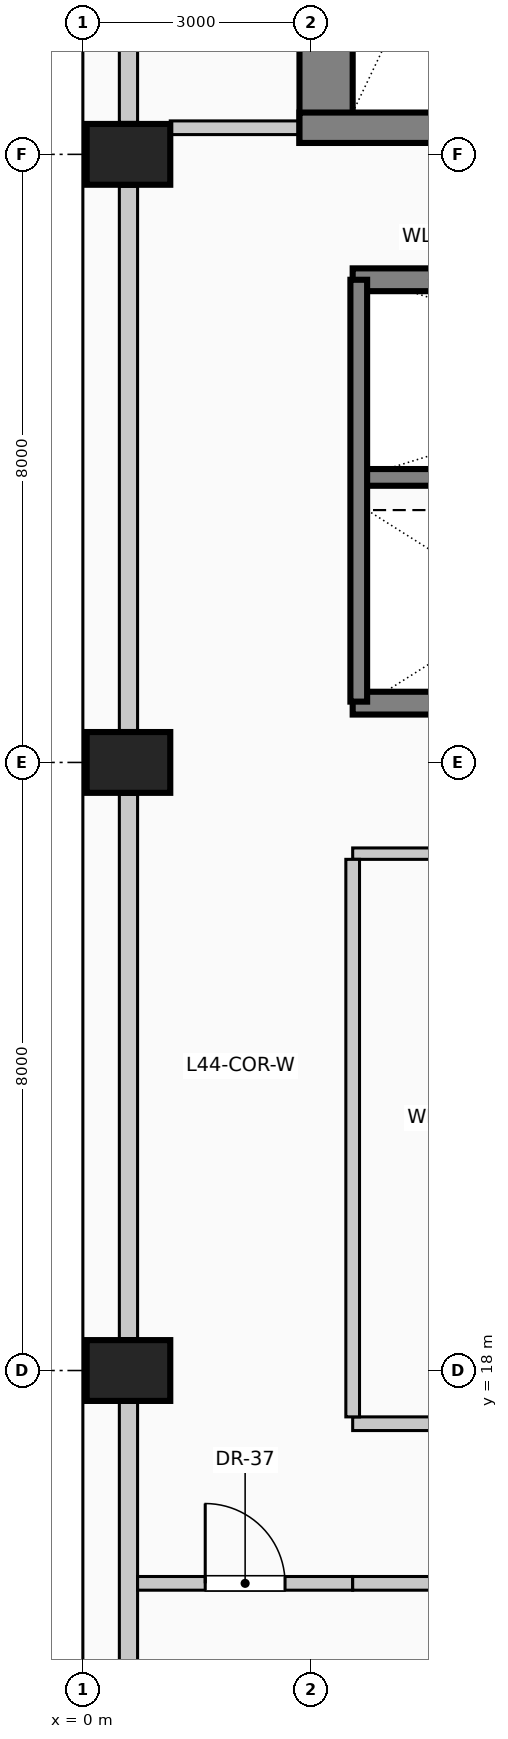
"""IFC4 building model, lengths in metres.
Left out: names, types, materials, properties, quantities, classifications, styles, units other than length and angle.
Written with IfcOpenShell. Run it as: python <this file> out.ifc"""

import sys

from ifc_helpers import new_model, si_unit, direction, frame, frame_2d, origin, origin_2d, place, context, subcontext, project, spatial, rectangle, extrude, element, fill, save


model = new_model("IFC4")
c1 = context("Model", 3, precision=1e-05, world=origin(), true_north=direction((0.0, 1.0)))
c2 = subcontext(c1, "Body", "Model", "MODEL_VIEW")
j1 = project(units=[si_unit("LENGTHUNIT", "METRE"), si_unit("PLANEANGLEUNIT", "RADIAN")], contexts=[c1])
p1 = place(None, origin())
s1 = spatial("IfcSite", under=j1, at=p1, CompositionType="ELEMENT")
p2 = place(p1, origin())
s2 = spatial("IfcBuilding", under=s1, at=p2, CompositionType="ELEMENT")
p3 = place(p2, frame((0.0, 0.0, 182.6)))
s3 = spatial("IfcBuildingStorey", under=s2, at=p3, CompositionType="ELEMENT", Elevation=182.6)
p4 = place(p3, frame((3.2, 34.15, 0.0), z_axis=(0.0, 0.0, 1.0), x_axis=(0.0, 1.0, 0.0)))
e1 = element("IfcWall", 1, at=p4, inside=s3, PredefinedType="SHEAR", context=c2, shape_type="SweptSolid", body=[
    extrude(rectangle(XDim=8.98, YDim=0.7, at=frame_2d((4.49, 0.0))), origin(), (0.0, 0.0, 1.0), 4.0),
])
p5 = place(p3, frame((2.85, 34.35, 0.0), z_axis=(0.0, 0.0, 1.0), x_axis=(1.0, 0.0, 0.0)))
e2 = element("IfcWall", 2, at=p5, inside=s3, PredefinedType="SHEAR", context=c2, shape_type="SweptSolid", body=[
    extrude(rectangle(XDim=4.86, YDim=0.4, at=frame_2d((2.43, 0.0))), origin(), (0.0, 0.0, 1.0), 4.0),
])
p6 = place(p5, frame((2.4, 0.0, 0.0)))
e3 = element("IfcOpeningElement", 3, at=p6, cuts=e2, PredefinedType="OPENING", context=c2, shape_type="SweptSolid", body=[
    extrude(rectangle(XDim=1.15, YDim=2.2, at=frame_2d((0.575, 1.1))), frame((0.0, 0.21, 0.0), z_axis=(0.0, -1.0, 0.0), x_axis=(1.0, 0.0, 0.0)), (0.0, 0.0, 1.0), 0.42),
])
for number, where, z_axis, x_axis in (
    (4, (0.6, 18.0, 0.0), (0.0, 0.0, 1.0), (0.0, 1.0, 0.0)),
    (5, (0.6, 26.0, 0.0), (0.0, 0.0, 1.0), (0.0, 1.0, 0.0)),
    (6, (0.6, 34.0, 0.0), (0.0, 0.0, 1.0), (0.0, 1.0, 0.0)),
):
    element("IfcColumn", number, at=place(p3, frame(where, z_axis=z_axis, x_axis=x_axis)), inside=s3, PredefinedType="COLUMN", context=c2, shape_type="SweptSolid", body=[
        extrude(rectangle(XDim=0.8, YDim=1.1, at=origin_2d()), origin(), (0.0, 0.0, 1.0), 4.0),
    ])
p7 = place(p3, frame((0.6, 10.42, 0.0), z_axis=(0.0, 0.0, 1.0), x_axis=(0.0, 1.0, 0.0)))
e7 = element("IfcWall", 7, at=p7, inside=s3, PredefinedType="SOLIDWALL", context=c2, shape_type="SweptSolid", body=[
    extrude(rectangle(XDim=7.16, YDim=0.24, at=frame_2d((3.58, 0.0))), origin(), (0.0, 0.0, 1.0), 3.0),
])
p8 = place(p7, frame((0.92, 0.0, 0.42)))
e8 = element("IfcOpeningElement", 8, at=p8, cuts=e7, PredefinedType="OPENING", context=c2, shape_type="SweptSolid", body=[
    extrude(rectangle(XDim=2.2, YDim=1.95, at=frame_2d((1.1, 0.975))), frame((0.0, 0.13, 0.0), z_axis=(0.0, -1.0, 0.0), x_axis=(1.0, 0.0, 0.0)), (0.0, 0.0, 1.0), 0.26),
])
for number, where, z_axis, x_axis in (
    (9, (0.6, 18.42, 0.0), (0.0, 0.0, 1.0), (0.0, 1.0, 0.0)),
    (10, (0.6, 26.42, 0.0), (0.0, 0.0, 1.0), (0.0, 1.0, 0.0)),
):
    element("IfcWall", number, at=place(p3, frame(where, z_axis=z_axis, x_axis=x_axis)), inside=s3, PredefinedType="SOLIDWALL", context=c2, shape_type="SweptSolid", body=[
        extrude(rectangle(XDim=7.16, YDim=0.24, at=frame_2d((3.58, 0.0))), origin(), (0.0, 0.0, 1.0), 3.0),
    ])
p9 = place(p3, frame((0.6, 34.42, 0.0), z_axis=(0.0, 0.0, 1.0), x_axis=(0.0, 1.0, 0.0)))
e11 = element("IfcWall", 11, at=p9, inside=s3, PredefinedType="SOLIDWALL", context=c2, shape_type="SweptSolid", body=[
    extrude(rectangle(XDim=7.56, YDim=0.24, at=frame_2d((3.78, 0.0))), origin(), (0.0, 0.0, 1.0), 3.0),
])
for number, where, z_axis, x_axis in (
    (12, (3.55, 32.35, 0.0), (0.0, 0.0, 1.0), (1.0, 0.0, 0.0)),
    (13, (5.65, 26.78, 0.0), (0.0, 0.0, 1.0), (-1.0, 0.0, 0.0)),
):
    element("IfcWall", number, at=place(p3, frame(where, z_axis=z_axis, x_axis=x_axis)), inside=s3, PredefinedType="SOLIDWALL", context=c2, shape_type="SweptSolid", body=[
        extrude(rectangle(XDim=2.1, YDim=0.3, at=frame_2d((1.05, 0.0))), origin(), (0.0, 0.0, 1.0), 4.0),
    ])
p10 = place(p3, frame((3.55, 29.75, 0.0), z_axis=(0.0, 0.0, 1.0), x_axis=(1.0, 0.0, 0.0)))
e14 = element("IfcWall", 14, at=p10, inside=s3, PredefinedType="SOLIDWALL", context=c2, shape_type="SweptSolid", body=[
    extrude(rectangle(XDim=8.65, YDim=0.22, at=frame_2d((4.325, 0.0))), origin(), (0.0, 0.0, 1.0), 4.0),
])
p11 = place(p3, frame((3.63, 26.8, 0.0), z_axis=(0.0, 0.0, 1.0), x_axis=(0.0, 1.0, 0.0)))
e15 = element("IfcWall", 15, at=p11, inside=s3, PredefinedType="SOLIDWALL", context=c2, shape_type="SweptSolid", body=[
    extrude(rectangle(XDim=5.55, YDim=0.22, at=frame_2d((2.775, 0.0))), origin(), (0.0, 0.0, 1.0), 4.0),
])
p12 = place(p3, frame((0.72, 15.2, 0.0), z_axis=(0.0, 0.0, 1.0), x_axis=(1.0, 0.0, 0.0)))
e16 = element("IfcWall", 16, at=p12, inside=s3, PredefinedType="PARTITIONING", context=c2, shape_type="SweptSolid", body=[
    extrude(rectangle(XDim=2.83, YDim=0.18, at=frame_2d((1.415, 0.0))), origin(), (0.0, 0.0, 1.0), 3.75),
])
p13 = place(p12, frame((0.89, 0.0, 0.0)))
e17 = element("IfcOpeningElement", 17, at=p13, cuts=e16, PredefinedType="OPENING", context=c2, shape_type="SweptSolid", body=[
    extrude(rectangle(XDim=1.05, YDim=2.15, at=frame_2d((0.525, 1.075))), frame((0.0, 0.1, 0.0), z_axis=(0.0, -1.0, 0.0), x_axis=(1.0, 0.0, 0.0)), (0.0, 0.0, 1.0), 0.2),
])
p14 = place(p3, frame((3.55, 15.2, 0.0), z_axis=(0.0, 0.0, 1.0), x_axis=(1.0, 0.0, 0.0)))
e18 = element("IfcWall", 18, at=p14, inside=s3, PredefinedType="PARTITIONING", context=c2, shape_type="SweptSolid", body=[
    extrude(rectangle(XDim=5.65, YDim=0.18, at=frame_2d((2.825, 0.0))), origin(), (0.0, 0.0, 1.0), 3.75),
])
p15 = place(p3, frame((3.55, 17.3, 0.0), z_axis=(0.0, 0.0, 1.0), x_axis=(1.0, 0.0, 0.0)))
e19 = element("IfcWall", 19, at=p15, inside=s3, PredefinedType="PARTITIONING", context=c2, shape_type="SweptSolid", body=[
    extrude(rectangle(XDim=6.25, YDim=0.18, at=frame_2d((3.125, 0.0))), origin(), (0.0, 0.0, 1.0), 3.75),
])
p16 = place(p15, frame((2.6, 0.0, 0.0)))
e20 = element("IfcOpeningElement", 20, at=p16, cuts=e19, PredefinedType="OPENING", context=c2, shape_type="SweptSolid", body=[
    extrude(rectangle(XDim=1.05, YDim=2.15, at=frame_2d((0.525, 1.075))), frame((0.0, 0.1, 0.0), z_axis=(0.0, -1.0, 0.0), x_axis=(1.0, 0.0, 0.0)), (0.0, 0.0, 1.0), 0.2),
])
p17 = place(p3, frame((3.55, 24.8, 0.0), z_axis=(0.0, 0.0, 1.0), x_axis=(1.0, 0.0, 0.0)))
e21 = element("IfcWall", 21, at=p17, inside=s3, PredefinedType="PARTITIONING", context=c2, shape_type="SweptSolid", body=[
    extrude(rectangle(XDim=6.25, YDim=0.15, at=frame_2d((3.125, 0.0))), origin(), (0.0, 0.0, 1.0), 3.75),
])
p18 = place(p3, frame((1.15, 34.35, 0.0), z_axis=(0.0, 0.0, 1.0), x_axis=(1.0, 0.0, 0.0)))
e22 = element("IfcWall", 22, at=p18, inside=s3, PredefinedType="PARTITIONING", context=c2, shape_type="SweptSolid", body=[
    extrude(rectangle(XDim=1.7, YDim=0.18, at=frame_2d((0.85, 0.0))), origin(), (0.0, 0.0, 1.0), 3.75),
])
p19 = place(p3, frame((3.55, 17.39, 0.0), z_axis=(0.0, 0.0, 1.0), x_axis=(0.0, 1.0, 0.0)))
e23 = element("IfcWall", 23, at=p19, inside=s3, PredefinedType="PARTITIONING", context=c2, shape_type="SweptSolid", body=[
    extrude(rectangle(XDim=7.335, YDim=0.18, at=frame_2d((3.667, 0.0))), origin(), (0.0, 0.0, 1.0), 3.75),
])
p20 = place(p13, origin())
e24 = element("IfcDoor", 24, at=p20, inside=s3, OperationType="SINGLE_SWING_LEFT", PredefinedType="DOOR", context=c2, shape_type="SweptSolid", body=[
    extrude(rectangle(XDim=1.05, YDim=2.15, at=frame_2d((0.525, 1.075))), frame((0.0, 0.025, 0.0), z_axis=(0.0, -1.0, 0.0), x_axis=(1.0, 0.0, 0.0)), (0.0, 0.0, 1.0), 0.05),
])
fill(e17, e24)
save(model, sys.argv[1])
